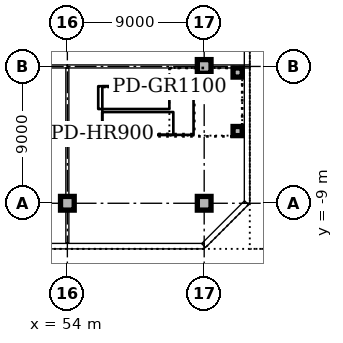
"""IFC4 building model, lengths in metres.
Left out: names, types, materials, properties, quantities, classifications, styles, units other than length and angle.
Written with IfcOpenShell. Run it as: python <this file> out.ifc"""

import sys

from ifc_helpers import new_model, si_unit, direction, frame, frame_2d, origin, origin_2d, place, context, subcontext, project, spatial, rectangle, extrude, element, fill, save


model = new_model("IFC4")
c1 = context("Model", 3, precision=1e-05, world=origin(), true_north=direction((0.0, 1.0)))
c2 = subcontext(c1, "Body", "Model", "MODEL_VIEW")
j1 = project(units=[si_unit("LENGTHUNIT", "METRE"), si_unit("PLANEANGLEUNIT", "RADIAN")], contexts=[c1])
p1 = place(None, origin())
s1 = spatial("IfcSite", under=j1, at=p1, CompositionType="ELEMENT")
p2 = place(p1, origin())
s2 = spatial("IfcBuilding", under=s1, at=p2, CompositionType="ELEMENT")
p3 = place(p2, origin())
s3 = spatial("IfcBuildingStorey", under=s2, at=p3, CompositionType="ELEMENT", Elevation=0.0)
for number, where, z_axis, x_axis in (
    (1, (54.0, -9.0, 0.0), (0.0, 0.0, 1.0), (1.0, 0.0, 0.0)),
    (2, (63.0, -9.0, 0.0), (0.0, 0.0, 1.0), (1.0, 0.0, 0.0)),
    (3, (63.0, 0.0, 0.0), (0.0, 0.0, 1.0), (1.0, 0.0, 0.0)),
):
    element("IfcColumn", number, at=place(p3, frame(where, z_axis=z_axis, x_axis=x_axis)), inside=s3, PredefinedType="COLUMN", context=c2, shape_type="SweptSolid", body=[
        extrude(rectangle(XDim=0.9, YDim=0.9, at=origin_2d()), origin(), (0.0, 0.0, 1.0), 5.7),
    ])
p4 = place(p3, frame((-4.5, -11.82, 0.0), z_axis=(0.0, 0.0, 1.0), x_axis=(1.0, 0.0, 0.0)))
e4 = element("IfcWall", 4, at=p4, inside=s3, PredefinedType="STANDARD", context=c2, shape_type="SweptSolid", body=[
    extrude(rectangle(XDim=67.5, YDim=0.36, at=frame_2d((33.75, 0.0))), origin(), (0.0, 0.0, 1.0), 5.7),
])
p5 = place(p4, frame((1.05, 0.0, 0.0)))
e5 = element("IfcOpeningElement", 5, at=p5, cuts=e4, PredefinedType="OPENING", context=c2, shape_type="SweptSolid", body=[
    extrude(rectangle(XDim=2.4, YDim=2.4, at=frame_2d((1.2, 1.2))), frame((0.0, 0.19, 0.0), z_axis=(0.0, -1.0, 0.0), x_axis=(1.0, 0.0, 0.0)), (0.0, 0.0, 1.0), 0.38),
])
p6 = place(p4, frame((48.3, 0.0, 0.0)))
e6 = element("IfcOpeningElement", 6, at=p6, cuts=e4, PredefinedType="OPENING", context=c2, shape_type="SweptSolid", body=[
    extrude(rectangle(XDim=2.4, YDim=2.4, at=frame_2d((1.2, 1.2))), frame((0.0, 0.19, 0.0), z_axis=(0.0, -1.0, 0.0), x_axis=(1.0, 0.0, 0.0)), (0.0, 0.0, 1.0), 0.38),
])
p7 = place(p4, frame((34.8, 0.0, 0.0)))
e7 = element("IfcOpeningElement", 7, at=p7, cuts=e4, PredefinedType="OPENING", context=c2, shape_type="SweptSolid", body=[
    extrude(rectangle(XDim=2.4, YDim=2.4, at=frame_2d((1.2, 1.2))), frame((0.0, 0.19, 0.0), z_axis=(0.0, -1.0, 0.0), x_axis=(1.0, 0.0, 0.0)), (0.0, 0.0, 1.0), 0.38),
])
p8 = place(p4, frame((7.8, 0.0, 0.0)))
e8 = element("IfcOpeningElement", 8, at=p8, cuts=e4, PredefinedType="OPENING", context=c2, shape_type="SweptSolid", body=[
    extrude(rectangle(XDim=2.4, YDim=2.4, at=frame_2d((1.2, 1.2))), frame((0.0, 0.19, 0.0), z_axis=(0.0, -1.0, 0.0), x_axis=(1.0, 0.0, 0.0)), (0.0, 0.0, 1.0), 0.38),
])
p9 = place(p4, frame((17.1, 0.0, 0.0)))
e9 = element("IfcOpeningElement", 9, at=p9, cuts=e4, PredefinedType="OPENING", context=c2, shape_type="SweptSolid", body=[
    extrude(rectangle(XDim=1.8, YDim=2.2, at=frame_2d((0.9, 1.1))), frame((0.0, 0.19, 0.0), z_axis=(0.0, -1.0, 0.0), x_axis=(1.0, 0.0, 0.0)), (0.0, 0.0, 1.0), 0.38),
])
p10 = place(p4, frame((63.6, 0.0, 0.0)))
e10 = element("IfcOpeningElement", 10, at=p10, cuts=e4, PredefinedType="OPENING", context=c2, shape_type="SweptSolid", body=[
    extrude(rectangle(XDim=1.8, YDim=2.2, at=frame_2d((0.9, 1.1))), frame((0.0, 0.19, 0.0), z_axis=(0.0, -1.0, 0.0), x_axis=(1.0, 0.0, 0.0)), (0.0, 0.0, 1.0), 0.38),
])
p11 = place(p4, frame((11.85, 0.0, 0.6)))
e11 = element("IfcOpeningElement", 11, at=p11, cuts=e4, PredefinedType="OPENING", context=c2, shape_type="SweptSolid", body=[
    extrude(rectangle(XDim=3.3, YDim=3.0, at=frame_2d((1.65, 1.5))), frame((0.0, 0.19, 0.0), z_axis=(0.0, -1.0, 0.0), x_axis=(1.0, 0.0, 0.0)), (0.0, 0.0, 1.0), 0.38),
])
p12 = place(p4, frame((20.85, 0.0, 0.6)))
e12 = element("IfcOpeningElement", 12, at=p12, cuts=e4, PredefinedType="OPENING", context=c2, shape_type="SweptSolid", body=[
    extrude(rectangle(XDim=3.3, YDim=3.0, at=frame_2d((1.65, 1.5))), frame((0.0, 0.19, 0.0), z_axis=(0.0, -1.0, 0.0), x_axis=(1.0, 0.0, 0.0)), (0.0, 0.0, 1.0), 0.38),
])
p13 = place(p4, frame((25.35, 0.0, 0.6)))
e13 = element("IfcOpeningElement", 13, at=p13, cuts=e4, PredefinedType="OPENING", context=c2, shape_type="SweptSolid", body=[
    extrude(rectangle(XDim=3.3, YDim=3.0, at=frame_2d((1.65, 1.5))), frame((0.0, 0.19, 0.0), z_axis=(0.0, -1.0, 0.0), x_axis=(1.0, 0.0, 0.0)), (0.0, 0.0, 1.0), 0.38),
])
p14 = place(p4, frame((29.85, 0.0, 0.6)))
e14 = element("IfcOpeningElement", 14, at=p14, cuts=e4, PredefinedType="OPENING", context=c2, shape_type="SweptSolid", body=[
    extrude(rectangle(XDim=3.3, YDim=3.0, at=frame_2d((1.65, 1.5))), frame((0.0, 0.19, 0.0), z_axis=(0.0, -1.0, 0.0), x_axis=(1.0, 0.0, 0.0)), (0.0, 0.0, 1.0), 0.38),
])
p15 = place(p4, frame((38.85, 0.0, 0.6)))
e15 = element("IfcOpeningElement", 15, at=p15, cuts=e4, PredefinedType="OPENING", context=c2, shape_type="SweptSolid", body=[
    extrude(rectangle(XDim=3.3, YDim=3.0, at=frame_2d((1.65, 1.5))), frame((0.0, 0.19, 0.0), z_axis=(0.0, -1.0, 0.0), x_axis=(1.0, 0.0, 0.0)), (0.0, 0.0, 1.0), 0.38),
])
p16 = place(p4, frame((43.35, 0.0, 0.6)))
e16 = element("IfcOpeningElement", 16, at=p16, cuts=e4, PredefinedType="OPENING", context=c2, shape_type="SweptSolid", body=[
    extrude(rectangle(XDim=3.3, YDim=3.0, at=frame_2d((1.65, 1.5))), frame((0.0, 0.19, 0.0), z_axis=(0.0, -1.0, 0.0), x_axis=(1.0, 0.0, 0.0)), (0.0, 0.0, 1.0), 0.38),
])
p17 = place(p4, frame((52.35, 0.0, 0.6)))
e17 = element("IfcOpeningElement", 17, at=p17, cuts=e4, PredefinedType="OPENING", context=c2, shape_type="SweptSolid", body=[
    extrude(rectangle(XDim=3.3, YDim=3.0, at=frame_2d((1.65, 1.5))), frame((0.0, 0.19, 0.0), z_axis=(0.0, -1.0, 0.0), x_axis=(1.0, 0.0, 0.0)), (0.0, 0.0, 1.0), 0.38),
])
p18 = place(p4, frame((56.85, 0.0, 0.6)))
e18 = element("IfcOpeningElement", 18, at=p18, cuts=e4, PredefinedType="OPENING", context=c2, shape_type="SweptSolid", body=[
    extrude(rectangle(XDim=3.3, YDim=3.0, at=frame_2d((1.65, 1.5))), frame((0.0, 0.19, 0.0), z_axis=(0.0, -1.0, 0.0), x_axis=(1.0, 0.0, 0.0)), (0.0, 0.0, 1.0), 0.38),
])
p19 = place(p3, frame((65.82, -9.0, 0.0), z_axis=(0.0, 0.0, 1.0), x_axis=(0.0, 1.0, 0.0)))
e19 = element("IfcWall", 19, at=p19, inside=s3, PredefinedType="STANDARD", context=c2, shape_type="SweptSolid", body=[
    extrude(rectangle(XDim=63.0, YDim=0.36, at=frame_2d((31.5, 0.0))), origin(), (0.0, 0.0, 1.0), 5.7),
])
p20 = place(p19, frame((30.6, 0.0, 0.0)))
e20 = element("IfcOpeningElement", 20, at=p20, cuts=e19, PredefinedType="OPENING", context=c2, shape_type="SweptSolid", body=[
    extrude(rectangle(XDim=1.8, YDim=2.2, at=frame_2d((0.9, 1.1))), frame((0.0, 0.19, 0.0), z_axis=(0.0, -1.0, 0.0), x_axis=(1.0, 0.0, 0.0)), (0.0, 0.0, 1.0), 0.38),
])
p21 = place(p19, frame((51.6, 0.0, 0.0)))
e21 = element("IfcOpeningElement", 21, at=p21, cuts=e19, PredefinedType="OPENING", context=c2, shape_type="SweptSolid", body=[
    extrude(rectangle(XDim=1.8, YDim=2.2, at=frame_2d((0.9, 1.1))), frame((0.0, 0.19, 0.0), z_axis=(0.0, -1.0, 0.0), x_axis=(1.0, 0.0, 0.0)), (0.0, 0.0, 1.0), 0.38),
])
p22 = place(p19, frame((9.6, 0.0, 0.0)))
e22 = element("IfcOpeningElement", 22, at=p22, cuts=e19, PredefinedType="OPENING", context=c2, shape_type="SweptSolid", body=[
    extrude(rectangle(XDim=2.4, YDim=2.2, at=frame_2d((1.2, 1.1))), frame((0.0, 0.19, 0.0), z_axis=(0.0, -1.0, 0.0), x_axis=(1.0, 0.0, 0.0)), (0.0, 0.0, 1.0), 0.38),
])
p23 = place(p19, frame((2.85, 0.0, 0.6)))
e23 = element("IfcOpeningElement", 23, at=p23, cuts=e19, PredefinedType="OPENING", context=c2, shape_type="SweptSolid", body=[
    extrude(rectangle(XDim=3.3, YDim=3.0, at=frame_2d((1.65, 1.5))), frame((0.0, 0.19, 0.0), z_axis=(0.0, -1.0, 0.0), x_axis=(1.0, 0.0, 0.0)), (0.0, 0.0, 1.0), 0.38),
])
p24 = place(p19, frame((16.35, 0.0, 0.6)))
e24 = element("IfcOpeningElement", 24, at=p24, cuts=e19, PredefinedType="OPENING", context=c2, shape_type="SweptSolid", body=[
    extrude(rectangle(XDim=3.3, YDim=3.0, at=frame_2d((1.65, 1.5))), frame((0.0, 0.19, 0.0), z_axis=(0.0, -1.0, 0.0), x_axis=(1.0, 0.0, 0.0)), (0.0, 0.0, 1.0), 0.38),
])
p25 = place(p19, frame((20.85, 0.0, 0.6)))
e25 = element("IfcOpeningElement", 25, at=p25, cuts=e19, PredefinedType="OPENING", context=c2, shape_type="SweptSolid", body=[
    extrude(rectangle(XDim=3.3, YDim=3.0, at=frame_2d((1.65, 1.5))), frame((0.0, 0.19, 0.0), z_axis=(0.0, -1.0, 0.0), x_axis=(1.0, 0.0, 0.0)), (0.0, 0.0, 1.0), 0.38),
])
p26 = place(p19, frame((25.35, 0.0, 0.6)))
e26 = element("IfcOpeningElement", 26, at=p26, cuts=e19, PredefinedType="OPENING", context=c2, shape_type="SweptSolid", body=[
    extrude(rectangle(XDim=3.3, YDim=3.0, at=frame_2d((1.65, 1.5))), frame((0.0, 0.19, 0.0), z_axis=(0.0, -1.0, 0.0), x_axis=(1.0, 0.0, 0.0)), (0.0, 0.0, 1.0), 0.38),
])
p27 = place(p19, frame((34.35, 0.0, 0.6)))
e27 = element("IfcOpeningElement", 27, at=p27, cuts=e19, PredefinedType="OPENING", context=c2, shape_type="SweptSolid", body=[
    extrude(rectangle(XDim=3.3, YDim=3.0, at=frame_2d((1.65, 1.5))), frame((0.0, 0.19, 0.0), z_axis=(0.0, -1.0, 0.0), x_axis=(1.0, 0.0, 0.0)), (0.0, 0.0, 1.0), 0.38),
])
p28 = place(p19, frame((38.85, 0.0, 0.6)))
e28 = element("IfcOpeningElement", 28, at=p28, cuts=e19, PredefinedType="OPENING", context=c2, shape_type="SweptSolid", body=[
    extrude(rectangle(XDim=3.3, YDim=3.0, at=frame_2d((1.65, 1.5))), frame((0.0, 0.19, 0.0), z_axis=(0.0, -1.0, 0.0), x_axis=(1.0, 0.0, 0.0)), (0.0, 0.0, 1.0), 0.38),
])
p29 = place(p19, frame((43.35, 0.0, 0.6)))
e29 = element("IfcOpeningElement", 29, at=p29, cuts=e19, PredefinedType="OPENING", context=c2, shape_type="SweptSolid", body=[
    extrude(rectangle(XDim=3.3, YDim=3.0, at=frame_2d((1.65, 1.5))), frame((0.0, 0.19, 0.0), z_axis=(0.0, -1.0, 0.0), x_axis=(1.0, 0.0, 0.0)), (0.0, 0.0, 1.0), 0.38),
])
p30 = place(p19, frame((47.85, 0.0, 0.6)))
e30 = element("IfcOpeningElement", 30, at=p30, cuts=e19, PredefinedType="OPENING", context=c2, shape_type="SweptSolid", body=[
    extrude(rectangle(XDim=3.3, YDim=3.0, at=frame_2d((1.65, 1.5))), frame((0.0, 0.19, 0.0), z_axis=(0.0, -1.0, 0.0), x_axis=(1.0, 0.0, 0.0)), (0.0, 0.0, 1.0), 0.38),
])
p31 = place(p19, frame((56.85, 0.0, 0.6)))
e31 = element("IfcOpeningElement", 31, at=p31, cuts=e19, PredefinedType="OPENING", context=c2, shape_type="SweptSolid", body=[
    extrude(rectangle(XDim=3.3, YDim=3.0, at=frame_2d((1.65, 1.5))), frame((0.0, 0.19, 0.0), z_axis=(0.0, -1.0, 0.0), x_axis=(1.0, 0.0, 0.0)), (0.0, 0.0, 1.0), 0.38),
])
p32 = place(p3, frame((62.961, -11.784, 0.0), z_axis=(0.0, 0.0, 1.0), x_axis=(0.707106781187, 0.707106781187, 0.0)))
e32 = element("IfcWall", 32, at=p32, inside=s3, PredefinedType="STANDARD", context=c2, shape_type="SweptSolid", body=[
    extrude(rectangle(XDim=3.993, YDim=0.36, at=frame_2d((1.996, 0.0))), origin(), (0.0, 0.0, 1.0), 5.7),
])
for number, where, z_axis, x_axis in (
    (33, (65.2, -4.25, 0.0), (0.0, 0.0, 1.0), (1.0, 0.0, 0.0)),
    (34, (65.2, -0.4, 0.0), (0.0, 0.0, 1.0), (1.0, 0.0, 0.0)),
):
    element("IfcColumn", number, at=place(p3, frame(where, z_axis=z_axis, x_axis=x_axis)), inside=s3, PredefinedType="COLUMN", context=c2, shape_type="SweptSolid", body=[
        extrude(rectangle(XDim=0.6, YDim=0.6, at=origin_2d()), origin(), (0.0, 0.0, 1.0), 6.0),
    ])
p33 = place(p3, frame((54.0, 0.0, 0.0), z_axis=(0.0, 0.0, 1.0), x_axis=(1.0, 0.0, 0.0)))
e35 = element("IfcWall", 35, at=p33, inside=s3, PredefinedType="SOLIDWALL", context=c2, shape_type="SweptSolid", body=[
    extrude(rectangle(XDim=8.53, YDim=0.2, at=frame_2d((4.265, 0.0))), origin(), (0.0, 0.0, 1.0), 5.7),
])
p34 = place(p3, frame((63.47, 0.0, 0.0), z_axis=(0.0, 0.0, 1.0), x_axis=(1.0, 0.0, 0.0)))
e36 = element("IfcWall", 36, at=p34, inside=s3, PredefinedType="SOLIDWALL", context=c2, shape_type="SweptSolid", body=[
    extrude(rectangle(XDim=2.53, YDim=0.2, at=frame_2d((1.265, 0.0))), origin(), (0.0, 0.0, 1.0), 5.7),
])
p35 = place(p3, frame((54.0, -11.6, 0.0), z_axis=(0.0, 0.0, 1.0), x_axis=(0.0, 1.0, 0.0)))
e37 = element("IfcWall", 37, at=p35, inside=s3, PredefinedType="SOLIDWALL", context=c2, shape_type="SweptSolid", body=[
    extrude(rectangle(XDim=2.13, YDim=0.2, at=frame_2d((1.065, 0.0))), origin(), (0.0, 0.0, 1.0), 5.7),
])
p36 = place(p3, frame((54.0, -8.53, 0.0), z_axis=(0.0, 0.0, 1.0), x_axis=(0.0, 1.0, 0.0)))
e38 = element("IfcWall", 38, at=p36, inside=s3, PredefinedType="SOLIDWALL", context=c2, shape_type="SweptSolid", body=[
    extrude(rectangle(XDim=8.43, YDim=0.2, at=frame_2d((4.215, 0.0))), origin(), (0.0, 0.0, 1.0), 5.7),
])
p37 = place(p3, frame((45.0, 0.0, 0.0), z_axis=(0.0, 0.0, 1.0), x_axis=(1.0, 0.0, 0.0)))
e39 = element("IfcWall", 39, at=p37, inside=s3, PredefinedType="PARTITIONING", context=c2, shape_type="SweptSolid", body=[
    extrude(rectangle(XDim=9.0, YDim=0.2, at=frame_2d((4.5, 0.0))), origin(), (0.0, 0.0, 1.0), 5.7),
])
p38 = place(p37, frame((7.7, 0.0, 0.0)))
e40 = element("IfcOpeningElement", 40, at=p38, cuts=e39, PredefinedType="OPENING", context=c2, shape_type="SweptSolid", body=[
    extrude(rectangle(XDim=1.0, YDim=2.1, at=frame_2d((0.5, 1.05))), frame((0.0, 0.11, 0.0), z_axis=(0.0, -1.0, 0.0), x_axis=(1.0, 0.0, 0.0)), (0.0, 0.0, 1.0), 0.22),
])
p39 = place(p10, frame((1.8, 0.0, 0.0), z_axis=(0.0, 0.0, 1.0), x_axis=(-1.0, 0.0, 0.0)))
e41 = element("IfcDoor", 41, at=p39, inside=s3, OperationType="DOUBLE_DOOR_SINGLE_SWING", PredefinedType="DOOR", context=c2, shape_type="SweptSolid", body=[
    extrude(rectangle(XDim=1.8, YDim=2.2, at=frame_2d((0.9, 1.1))), frame((0.0, -0.07, 0.0), z_axis=(0.0, -1.0, 0.0), x_axis=(1.0, 0.0, 0.0)), (0.0, 0.0, 1.0), 0.05),
])
fill(e10, e41)
p40 = place(p18, origin())
e42 = element("IfcWindow", 42, at=p40, inside=s3, PartitioningType="SINGLE_PANEL", PredefinedType="WINDOW", context=c2, shape_type="SweptSolid", body=[
    extrude(rectangle(XDim=3.3, YDim=3.0, at=frame_2d((1.65, 1.5))), frame((0.0, 0.13, 0.0), z_axis=(0.0, -1.0, 0.0), x_axis=(1.0, 0.0, 0.0)), (0.0, 0.0, 1.0), 0.06),
])
fill(e18, e42)
p41 = place(p22, frame((2.4, 0.0, 0.0), z_axis=(0.0, 0.0, 1.0), x_axis=(-1.0, 0.0, 0.0)))
e43 = element("IfcDoor", 43, at=p41, inside=s3, OperationType="DOUBLE_DOOR_SINGLE_SWING", PredefinedType="DOOR", context=c2, shape_type="SweptSolid", body=[
    extrude(rectangle(XDim=2.4, YDim=2.2, at=frame_2d((1.2, 1.1))), frame((0.0, -0.07, 0.0), z_axis=(0.0, -1.0, 0.0), x_axis=(1.0, 0.0, 0.0)), (0.0, 0.0, 1.0), 0.05),
])
fill(e22, e43)
p42 = place(p23, origin())
e44 = element("IfcWindow", 44, at=p42, inside=s3, PartitioningType="SINGLE_PANEL", PredefinedType="WINDOW", context=c2, shape_type="SweptSolid", body=[
    extrude(rectangle(XDim=3.3, YDim=3.0, at=frame_2d((1.65, 1.5))), frame((0.0, 0.13, 0.0), z_axis=(0.0, -1.0, 0.0), x_axis=(1.0, 0.0, 0.0)), (0.0, 0.0, 1.0), 0.06),
])
fill(e23, e44)
p43 = place(p38, origin())
e45 = element("IfcDoor", 45, at=p43, inside=s3, OperationType="SINGLE_SWING_RIGHT", PredefinedType="DOOR", context=c2, shape_type="SweptSolid", body=[
    extrude(rectangle(XDim=1.0, YDim=2.1, at=frame_2d((0.5, 1.05))), frame((0.0, 0.025, 0.0), z_axis=(0.0, -1.0, 0.0), x_axis=(1.0, 0.0, 0.0)), (0.0, 0.0, 1.0), 0.05),
])
fill(e40, e45)
save(model, sys.argv[1])
